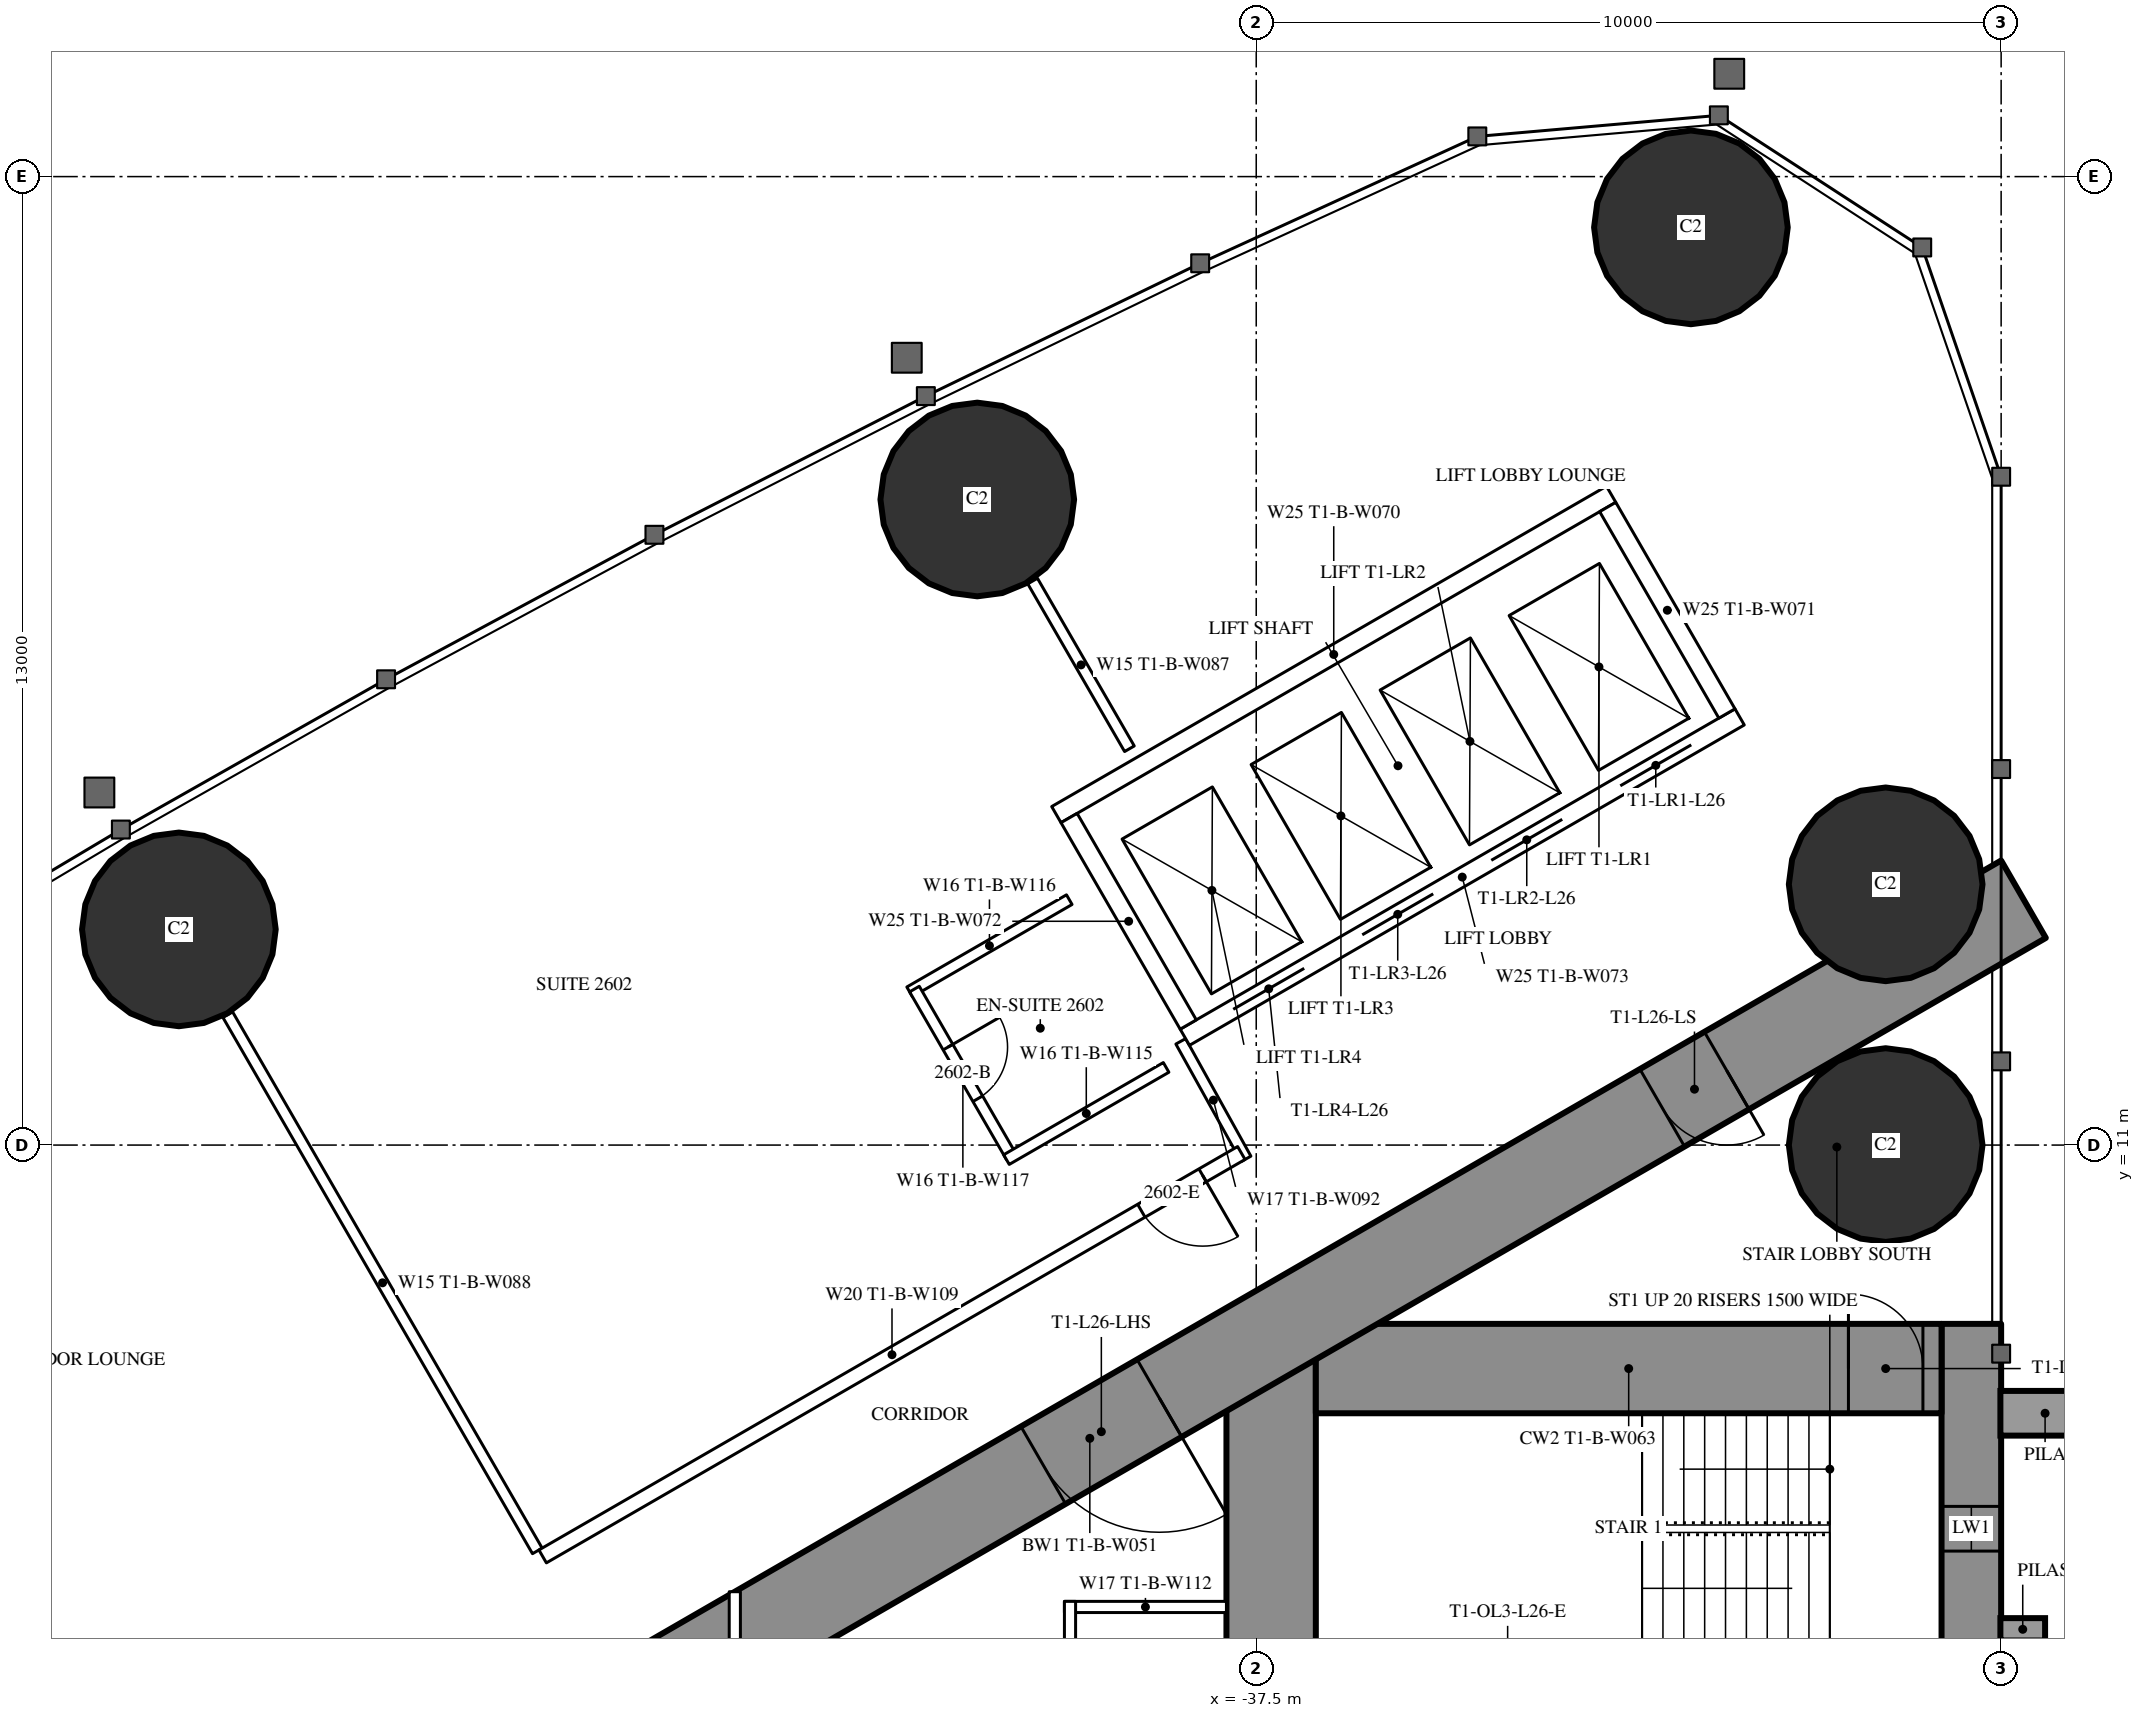
"""IFC4 building model, lengths in metres.
Left out: names, types, materials, properties, quantities, classifications, styles, units other than length and angle.
Written with IfcOpenShell. Run it as: python <this file> out.ifc"""

import sys

from ifc_helpers import new_model, si_unit, direction, frame, frame_2d, origin, origin_2d, place, context, subcontext, project, spatial, rectangle, hollow_circle, extrude, element, fill, save


model = new_model("IFC4")
c1 = context("Model", 3, precision=1e-05, world=origin(), true_north=direction((0.0, 1.0)))
c2 = subcontext(c1, "Body", "Model", "MODEL_VIEW")
j1 = project(units=[si_unit("LENGTHUNIT", "METRE"), si_unit("PLANEANGLEUNIT", "RADIAN")], contexts=[c1])
p1 = place(None, origin())
s1 = spatial("IfcSite", under=j1, at=p1, CompositionType="ELEMENT")
p2 = place(p1, origin())
s2 = spatial("IfcBuilding", under=s1, at=p2, CompositionType="ELEMENT")
p3 = place(p2, frame((0.0, 0.0, 101.1)))
s3 = spatial("IfcBuildingStorey", under=s2, at=p3, CompositionType="ELEMENT", Elevation=101.1)
for number, where, z_axis, x_axis in (
    (1, (-31.665, 23.318, 0.0), (0.0, 0.0, 1.0), (1.0, 0.0, 0.0)),
    (2, (-29.05, 11.0, 0.0), (0.0, 0.0, 1.0), (1.0, 0.0, 0.0)),
    (3, (-29.05, 14.5, 0.0), (0.0, 0.0, 1.0), (1.0, 0.0, 0.0)),
    (4, (-41.245, 19.666, 0.0), (0.0, 0.0, 1.0), (1.0, 0.0, 0.0)),
    (5, (-51.963, 13.895, 0.0), (0.0, 0.0, 1.0), (1.0, 0.0, 0.0)),
):
    element("IfcColumn", number, at=place(p3, frame(where, z_axis=z_axis, x_axis=x_axis)), inside=s3, PredefinedType="COLUMN", context=c2, shape_type="SweptSolid", body=[
        extrude(hollow_circle(Radius=1.3, WallThickness=0.1, at=origin_2d()), origin(), (0.0, 0.0, 1.0), 3.5),
    ])
p4 = place(p3, frame((-27.9, 8.6, 0.0), z_axis=(0.0, 0.0, 1.0), x_axis=(0.0, -1.0, 0.0)))
e6 = element("IfcWall", 6, at=p4, inside=s3, PredefinedType="SHEAR", context=c2, shape_type="SweptSolid", body=[
    extrude(rectangle(XDim=17.2, YDim=0.8, at=frame_2d((8.6, 0.0))), origin(), (0.0, 0.0, 1.0), 3.5),
])
p5 = place(p4, frame((2.45, 0.0, 0.6)))
e7 = element("IfcOpeningElement", 7, at=p5, cuts=e6, PredefinedType="OPENING", context=c2, shape_type="SweptSolid", body=[
    extrude(rectangle(XDim=0.6, YDim=2.1, at=frame_2d((0.3, 1.05))), frame((0.0, 0.41, 0.0), z_axis=(0.0, -1.0, 0.0), x_axis=(1.0, 0.0, 0.0)), (0.0, 0.0, 1.0), 0.82),
])
p6 = place(p4, frame((14.15, 0.0, 0.6)))
e8 = element("IfcOpeningElement", 8, at=p6, cuts=e6, PredefinedType="OPENING", context=c2, shape_type="SweptSolid", body=[
    extrude(rectangle(XDim=0.6, YDim=2.1, at=frame_2d((0.3, 1.05))), frame((0.0, 0.41, 0.0), z_axis=(0.0, -1.0, 0.0), x_axis=(1.0, 0.0, 0.0)), (0.0, 0.0, 1.0), 0.82),
])
p7 = place(p3, frame((-37.3, 8.6, 0.0), z_axis=(0.0, 0.0, 1.0), x_axis=(0.0, -1.0, 0.0)))
e9 = element("IfcWall", 9, at=p7, inside=s3, PredefinedType="SHEAR", context=c2, shape_type="SweptSolid", body=[
    extrude(rectangle(XDim=17.2, YDim=1.2, at=frame_2d((8.6, 0.0))), origin(), (0.0, 0.0, 1.0), 3.5),
])
p8 = place(p7, frame((7.7, 0.0, 0.0)))
e10 = element("IfcOpeningElement", 10, at=p8, cuts=e9, PredefinedType="OPENING", context=c2, shape_type="SweptSolid", body=[
    extrude(rectangle(XDim=1.8, YDim=2.2, at=frame_2d((0.9, 1.1))), frame((0.0, 0.61, 0.0), z_axis=(0.0, -1.0, 0.0), x_axis=(1.0, 0.0, 0.0)), (0.0, 0.0, 1.0), 1.22),
])
p9 = place(p3, frame((-28.3, 8.0, 0.0), z_axis=(0.0, 0.0, 1.0), x_axis=(-1.0, 0.0, 0.0)))
e11 = element("IfcWall", 11, at=p9, inside=s3, PredefinedType="SHEAR", context=c2, shape_type="SweptSolid", body=[
    extrude(rectangle(XDim=8.4, YDim=1.2, at=frame_2d((4.2, 0.0))), origin(), (0.0, 0.0, 1.0), 3.5),
])
p10 = place(p9, frame((0.25, 0.0, 0.0)))
e12 = element("IfcOpeningElement", 12, at=p10, cuts=e11, PredefinedType="OPENING", context=c2, shape_type="SweptSolid", body=[
    extrude(rectangle(XDim=1.0, YDim=2.2, at=frame_2d((0.5, 1.1))), frame((0.0, 0.61, 0.0), z_axis=(0.0, -1.0, 0.0), x_axis=(1.0, 0.0, 0.0)), (0.0, 0.0, 1.0), 1.22),
])
p11 = place(p3, frame((-27.2, 14.3, 0.0), z_axis=(0.0, 0.0, 1.0), x_axis=(-0.866026593062, -0.499997940104, 0.0)))
e13 = element("IfcWall", 13, at=p11, inside=s3, PredefinedType="SHEAR", context=c2, shape_type="SweptSolid", body=[
    extrude(rectangle(XDim=28.946, YDim=1.2, at=frame_2d((14.473, 0.0))), origin(), (0.0, 0.0, 1.0), 3.5),
])
p12 = place(p11, frame((4.6, 0.0, 0.0)))
e14 = element("IfcOpeningElement", 14, at=p12, cuts=e13, PredefinedType="OPENING", context=c2, shape_type="SweptSolid", body=[
    extrude(rectangle(XDim=1.0, YDim=2.2, at=frame_2d((0.5, 1.1))), frame((0.0, 0.61, 0.0), z_axis=(0.0, -1.0, 0.0), x_axis=(1.0, 0.0, 0.0)), (0.0, 0.0, 1.0), 1.22),
])
p13 = place(p11, frame((13.395, 0.0, 0.0)))
e15 = element("IfcOpeningElement", 15, at=p13, cuts=e13, PredefinedType="OPENING", context=c2, shape_type="SweptSolid", body=[
    extrude(rectangle(XDim=1.8, YDim=2.2, at=frame_2d((0.9, 1.1))), frame((0.0, 0.61, 0.0), z_axis=(0.0, -1.0, 0.0), x_axis=(1.0, 0.0, 0.0)), (0.0, 0.0, 1.0), 1.22),
])
p14 = place(p3, frame((-47.151, 5.552, 0.0), z_axis=(0.0, 0.0, 1.0), x_axis=(-0.500003012045, 0.866023664773, 0.0)))
e16 = element("IfcWall", 16, at=p14, inside=s3, PredefinedType="PARTITIONING", context=c2, shape_type="SweptSolid", body=[
    extrude(rectangle(XDim=8.311, YDim=0.15, at=frame_2d((4.156, 0.0))), origin(), (0.0, 0.0, 1.0), 2.2),
])
p15 = place(p3, frame((-39.202, 16.32, 0.0), z_axis=(0.0, 0.0, 1.0), x_axis=(-0.499947391036, 0.866055775454, 0.0)))
e17 = element("IfcWall", 17, at=p15, inside=s3, PredefinedType="PARTITIONING", context=c2, shape_type="SweptSolid", body=[
    extrude(rectangle(XDim=2.599, YDim=0.15, at=frame_2d((1.3, 0.0))), origin(), (0.0, 0.0, 1.0), 3.25),
])
p16 = place(p3, frame((-38.513, 12.392, 0.0), z_axis=(0.0, 0.0, 1.0), x_axis=(0.485585508183, -0.874189175317, 0.0)))
e18 = element("IfcWall", 18, at=p16, inside=s3, PredefinedType="PARTITIONING", context=c2, shape_type="SweptSolid", body=[
    extrude(rectangle(XDim=1.805, YDim=0.15, at=frame_2d((0.902, 0.0))), origin(), (0.0, 0.0, 1.0), 3.25),
])
p17 = place(p3, frame((-37.7, 10.894, 0.0), z_axis=(0.0, 0.0, 1.0), x_axis=(-0.866027551079, -0.499996280759, 0.0)))
e19 = element("IfcWall", 19, at=p17, inside=s3, PredefinedType="PARTITIONING", context=c2, shape_type="SweptSolid", body=[
    extrude(rectangle(XDim=10.831, YDim=0.2, at=frame_2d((5.415, 0.0))), origin(), (0.0, 0.0, 1.0), 3.25),
])
p18 = place(p17, frame((0.6, 0.0, 0.0)))
e20 = element("IfcOpeningElement", 20, at=p18, cuts=e19, PredefinedType="OPENING", context=c2, shape_type="SweptSolid", body=[
    extrude(rectangle(XDim=0.95, YDim=2.2, at=frame_2d((0.475, 1.1))), frame((0.0, 0.11, 0.0), z_axis=(0.0, -1.0, 0.0), x_axis=(1.0, 0.0, 0.0)), (0.0, 0.0, 1.0), 0.22),
])
p19 = place(p3, frame((-40.01, 14.294, 0.0), z_axis=(0.0, 0.0, 1.0), x_axis=(-0.866031185235, -0.4999899861, 0.0)))
e21 = element("IfcWall", 21, at=p19, inside=s3, PredefinedType="PARTITIONING", context=c2, shape_type="SweptSolid", body=[
    extrude(rectangle(XDim=2.475, YDim=0.15, at=frame_2d((1.238, 0.0))), origin(), (0.0, 0.0, 1.0), 3.25),
])
p20 = place(p3, frame((-40.788, 10.843, 0.0), z_axis=(0.0, 0.0, 1.0), x_axis=(-0.500006934395, 0.866021400173, 0.0)))
e22 = element("IfcWall", 22, at=p20, inside=s3, PredefinedType="PARTITIONING", context=c2, shape_type="SweptSolid", body=[
    extrude(rectangle(XDim=2.6, YDim=0.15, at=frame_2d((1.3, 0.0))), origin(), (0.0, 0.0, 1.0), 3.25),
])
p21 = place(p20, frame((0.9, 0.0, 0.0)))
e23 = element("IfcOpeningElement", 23, at=p21, cuts=e22, PredefinedType="OPENING", context=c2, shape_type="SweptSolid", body=[
    extrude(rectangle(XDim=0.8, YDim=2.2, at=frame_2d((0.4, 1.1))), frame((0.0, 0.085, 0.0), z_axis=(0.0, -1.0, 0.0), x_axis=(1.0, 0.0, 0.0)), (0.0, 0.0, 1.0), 0.17),
])
p22 = place(p3, frame((-38.71, 12.042, 0.0), z_axis=(0.0, 0.0, 1.0), x_axis=(-0.86604923931, -0.499958713387, 0.0)))
e24 = element("IfcWall", 24, at=p22, inside=s3, PredefinedType="PARTITIONING", context=c2, shape_type="SweptSolid", body=[
    extrude(rectangle(XDim=2.475, YDim=0.15, at=frame_2d((1.237, 0.0))), origin(), (0.0, 0.0, 1.0), 3.25),
])
p23 = place(p3, frame((-37.9, 4.8, 0.0), z_axis=(0.0, 0.0, 1.0), x_axis=(-1.0, 0.0, 0.0)))
e25 = element("IfcWall", 25, at=p23, inside=s3, PredefinedType="PARTITIONING", context=c2, shape_type="SweptSolid", body=[
    extrude(rectangle(XDim=2.175, YDim=0.15, at=frame_2d((1.087, 0.0))), origin(), (0.0, 0.0, 1.0), 3.25),
])
p24 = place(p3, frame((-40.0, 4.875, 0.0), z_axis=(0.0, 0.0, 1.0), x_axis=(0.0, -1.0, 0.0)))
e26 = element("IfcWall", 26, at=p24, inside=s3, PredefinedType="PARTITIONING", context=c2, shape_type="SweptSolid", body=[
    extrude(rectangle(XDim=3.75, YDim=0.15, at=frame_2d((1.875, 0.0))), origin(), (0.0, 0.0, 1.0), 3.25),
])
p25 = place(p24, frame((1.375, 0.0, 0.0)))
e27 = element("IfcOpeningElement", 27, at=p25, cuts=e26, PredefinedType="OPENING", context=c2, shape_type="SweptSolid", body=[
    extrude(rectangle(XDim=1.0, YDim=2.2, at=frame_2d((0.5, 1.1))), frame((0.0, 0.085, 0.0), z_axis=(0.0, -1.0, 0.0), x_axis=(1.0, 0.0, 0.0)), (0.0, 0.0, 1.0), 0.17),
])
p26 = place(p3, frame((-44.5, 5.005, 0.0), z_axis=(0.0, 0.0, 1.0), x_axis=(0.0, -1.0, 0.0)))
e28 = element("IfcWall", 28, at=p26, inside=s3, PredefinedType="PARTITIONING", context=c2, shape_type="SweptSolid", body=[
    extrude(rectangle(XDim=10.009, YDim=0.15, at=frame_2d((5.005, 0.0))), origin(), (0.0, 0.0, 1.0), 2.45),
])
p27 = place(p26, frame((4.505, 0.0, 0.0)))
e29 = element("IfcOpeningElement", 29, at=p27, cuts=e28, PredefinedType="OPENING", context=c2, shape_type="SweptSolid", body=[
    extrude(rectangle(XDim=1.0, YDim=2.2, at=frame_2d((0.5, 1.1))), frame((0.0, 0.085, 0.0), z_axis=(0.0, -1.0, 0.0), x_axis=(1.0, 0.0, 0.0)), (0.0, 0.0, 1.0), 0.17),
])
p28 = place(p3, frame((-31.01, 16.747, 0.0), z_axis=(0.0, 0.0, 1.0), x_axis=(-0.866028165386, -0.499995216735, 0.0)))
e30 = element("IfcWall", 30, at=p28, inside=s3, PredefinedType="PARTITIONING", context=c2, shape_type="SweptSolid", body=[
    extrude(rectangle(XDim=8.6, YDim=0.25, at=frame_2d((4.3, 0.0))), origin(), (0.0, 0.0, 1.0), 3.25),
])
p29 = place(p28, frame((0.75, 0.0, 0.0)))
e31 = element("IfcOpeningElement", 31, at=p29, cuts=e30, PredefinedType="OPENING", context=c2, shape_type="SweptSolid", body=[
    extrude(rectangle(XDim=1.1, YDim=2.2, at=frame_2d((0.55, 1.1))), frame((0.0, 0.135, 0.0), z_axis=(0.0, -1.0, 0.0), x_axis=(1.0, 0.0, 0.0)), (0.0, 0.0, 1.0), 0.27),
])
p30 = place(p28, frame((2.75, 0.0, 0.0)))
e32 = element("IfcOpeningElement", 32, at=p30, cuts=e30, PredefinedType="OPENING", context=c2, shape_type="SweptSolid", body=[
    extrude(rectangle(XDim=1.1, YDim=2.2, at=frame_2d((0.55, 1.1))), frame((0.0, 0.135, 0.0), z_axis=(0.0, -1.0, 0.0), x_axis=(1.0, 0.0, 0.0)), (0.0, 0.0, 1.0), 0.27),
])
p31 = place(p28, frame((4.75, 0.0, 0.0)))
e33 = element("IfcOpeningElement", 33, at=p31, cuts=e30, PredefinedType="OPENING", context=c2, shape_type="SweptSolid", body=[
    extrude(rectangle(XDim=1.1, YDim=2.2, at=frame_2d((0.55, 1.1))), frame((0.0, 0.135, 0.0), z_axis=(0.0, -1.0, 0.0), x_axis=(1.0, 0.0, 0.0)), (0.0, 0.0, 1.0), 0.27),
])
p32 = place(p28, frame((6.75, 0.0, 0.0)))
e34 = element("IfcOpeningElement", 34, at=p32, cuts=e30, PredefinedType="OPENING", context=c2, shape_type="SweptSolid", body=[
    extrude(rectangle(XDim=1.1, YDim=2.2, at=frame_2d((0.55, 1.1))), frame((0.0, 0.135, 0.0), z_axis=(0.0, -1.0, 0.0), x_axis=(1.0, 0.0, 0.0)), (0.0, 0.0, 1.0), 0.27),
])
p33 = place(p3, frame((-32.736, 19.736, 0.0), z_axis=(0.0, 0.0, 1.0), x_axis=(-0.866028165386, -0.499995216735, 0.0)))
e35 = element("IfcWall", 35, at=p33, inside=s3, PredefinedType="PARTITIONING", context=c2, shape_type="SweptSolid", body=[
    extrude(rectangle(XDim=8.6, YDim=0.25, at=frame_2d((4.3, 0.0))), origin(), (0.0, 0.0, 1.0), 3.25),
])
p34 = place(p3, frame((-31.181, 16.793, 0.0), z_axis=(0.0, 0.0, 1.0), x_axis=(-0.499929347863, 0.866066190972, 0.0)))
e36 = element("IfcWall", 36, at=p34, inside=s3, PredefinedType="PARTITIONING", context=c2, shape_type="SweptSolid", body=[
    extrude(rectangle(XDim=3.201, YDim=0.25, at=frame_2d((1.6, 0.0))), origin(), (0.0, 0.0, 1.0), 3.25),
])
p35 = place(p3, frame((-38.413, 12.618, 0.0), z_axis=(0.0, 0.0, 1.0), x_axis=(-0.499872130319, 0.866099216793, 0.0)))
e37 = element("IfcWall", 37, at=p35, inside=s3, PredefinedType="PARTITIONING", context=c2, shape_type="SweptSolid", body=[
    extrude(rectangle(XDim=3.2, YDim=0.25, at=frame_2d((1.6, 0.0))), origin(), (0.0, 0.0, 1.0), 3.25),
])
p36 = place(p21, origin())
e38 = element("IfcDoor", 38, at=p36, inside=s3, OperationType="SINGLE_SWING_RIGHT", PredefinedType="DOOR", context=c2, shape_type="SweptSolid", body=[
    extrude(rectangle(XDim=0.8, YDim=2.2, at=frame_2d((0.4, 1.1))), frame((0.0, 0.025, 0.0), z_axis=(0.0, -1.0, 0.0), x_axis=(1.0, 0.0, 0.0)), (0.0, 0.0, 1.0), 0.05),
])
fill(e23, e38)
p37 = place(p18, origin())
e39 = element("IfcDoor", 39, at=p37, inside=s3, OperationType="SINGLE_SWING_LEFT", PredefinedType="DOOR", context=c2, shape_type="SweptSolid", body=[
    extrude(rectangle(XDim=0.95, YDim=2.2, at=frame_2d((0.475, 1.1))), frame((0.0, 0.025, 0.0), z_axis=(0.0, -1.0, 0.0), x_axis=(1.0, 0.0, 0.0)), (0.0, 0.0, 1.0), 0.05),
])
fill(e20, e39)
p38 = place(p12, origin())
e40 = element("IfcDoor", 40, at=p38, inside=s3, OperationType="SINGLE_SWING_LEFT", PredefinedType="DOOR", context=c2, shape_type="SweptSolid", body=[
    extrude(rectangle(XDim=1.0, YDim=2.2, at=frame_2d((0.5, 1.1))), frame((0.0, 0.025, 0.0), z_axis=(0.0, -1.0, 0.0), x_axis=(1.0, 0.0, 0.0)), (0.0, 0.0, 1.0), 0.05),
])
fill(e14, e40)
p39 = place(p13, origin())
e41 = element("IfcDoor", 41, at=p39, inside=s3, OperationType="DOUBLE_DOOR_SINGLE_SWING", PredefinedType="DOOR", context=c2, shape_type="SweptSolid", body=[
    extrude(rectangle(XDim=1.8, YDim=2.2, at=frame_2d((0.9, 1.1))), frame((0.0, 0.025, 0.0), z_axis=(0.0, -1.0, 0.0), x_axis=(1.0, 0.0, 0.0)), (0.0, 0.0, 1.0), 0.05),
])
fill(e15, e41)
p40 = place(p10, origin())
e42 = element("IfcDoor", 42, at=p40, inside=s3, OperationType="SINGLE_SWING_RIGHT", PredefinedType="DOOR", context=c2, shape_type="SweptSolid", body=[
    extrude(rectangle(XDim=1.0, YDim=2.2, at=frame_2d((0.5, 1.1))), frame((0.0, 0.025, 0.0), z_axis=(0.0, -1.0, 0.0), x_axis=(1.0, 0.0, 0.0)), (0.0, 0.0, 1.0), 0.05),
])
fill(e12, e42)
p41 = place(p29, origin())
e43 = element("IfcDoor", 43, at=p41, inside=s3, OperationType="DOUBLE_DOOR_SLIDING", PredefinedType="USERDEFINED", context=c2, shape_type="SweptSolid", body=[
    extrude(rectangle(XDim=1.1, YDim=2.2, at=frame_2d((0.55, 1.1))), frame((0.0, 0.025, 0.0), z_axis=(0.0, -1.0, 0.0), x_axis=(1.0, 0.0, 0.0)), (0.0, 0.0, 1.0), 0.05),
])
fill(e31, e43)
p42 = place(p30, origin())
e44 = element("IfcDoor", 44, at=p42, inside=s3, OperationType="DOUBLE_DOOR_SLIDING", PredefinedType="USERDEFINED", context=c2, shape_type="SweptSolid", body=[
    extrude(rectangle(XDim=1.1, YDim=2.2, at=frame_2d((0.55, 1.1))), frame((0.0, 0.025, 0.0), z_axis=(0.0, -1.0, 0.0), x_axis=(1.0, 0.0, 0.0)), (0.0, 0.0, 1.0), 0.05),
])
fill(e32, e44)
p43 = place(p31, origin())
e45 = element("IfcDoor", 45, at=p43, inside=s3, OperationType="DOUBLE_DOOR_SLIDING", PredefinedType="USERDEFINED", context=c2, shape_type="SweptSolid", body=[
    extrude(rectangle(XDim=1.1, YDim=2.2, at=frame_2d((0.55, 1.1))), frame((0.0, 0.025, 0.0), z_axis=(0.0, -1.0, 0.0), x_axis=(1.0, 0.0, 0.0)), (0.0, 0.0, 1.0), 0.05),
])
fill(e33, e45)
p44 = place(p32, origin())
e46 = element("IfcDoor", 46, at=p44, inside=s3, OperationType="DOUBLE_DOOR_SLIDING", PredefinedType="USERDEFINED", context=c2, shape_type="SweptSolid", body=[
    extrude(rectangle(XDim=1.1, YDim=2.2, at=frame_2d((0.55, 1.1))), frame((0.0, 0.025, 0.0), z_axis=(0.0, -1.0, 0.0), x_axis=(1.0, 0.0, 0.0)), (0.0, 0.0, 1.0), 0.05),
])
fill(e34, e46)
p45 = place(p5, origin())
e47 = element("IfcWindow", 47, at=p45, inside=s3, PartitioningType="SINGLE_PANEL", PredefinedType="WINDOW", context=c2, shape_type="SweptSolid", body=[
    extrude(rectangle(XDim=0.6, YDim=2.1, at=frame_2d((0.3, 1.05))), frame((0.0, 0.03, 0.0), z_axis=(0.0, -1.0, 0.0), x_axis=(1.0, 0.0, 0.0)), (0.0, 0.0, 1.0), 0.06),
])
fill(e7, e47)
save(model, sys.argv[1])
